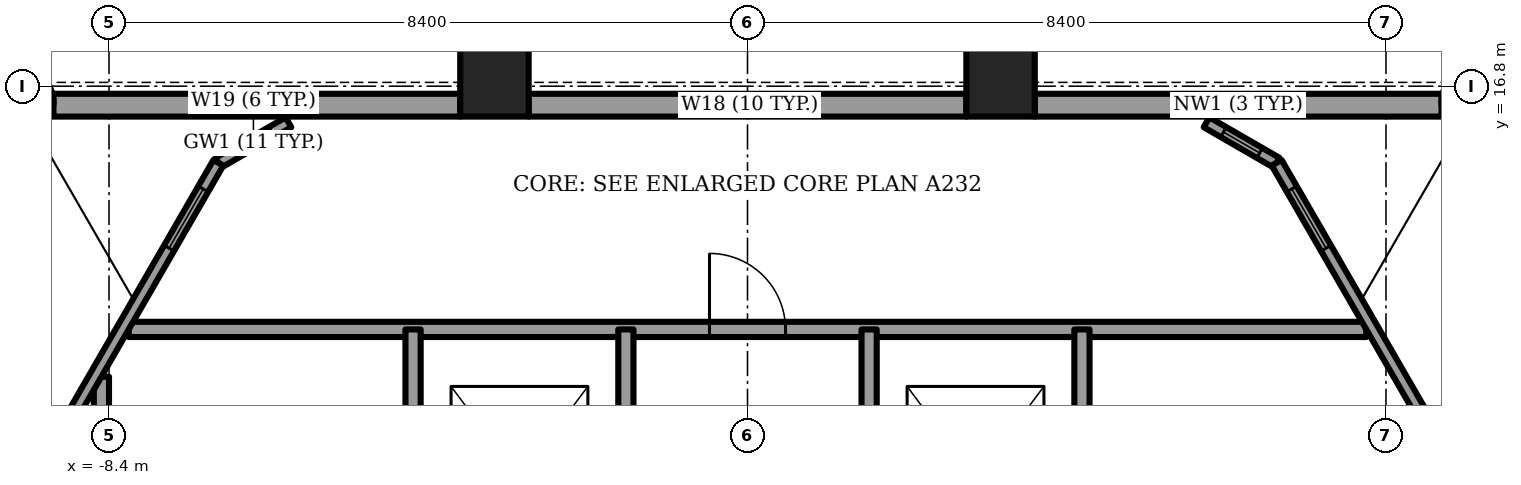
"""IFC4 building model, lengths in metres.
Left out: names, types, materials, properties, quantities, classifications, styles, units other than length and angle.
Written with IfcOpenShell. Run it as: python <this file> out.ifc"""

import sys

from ifc_helpers import new_model, si_unit, direction, frame, frame_2d, origin, origin_2d, place, context, subcontext, project, spatial, rectangle, circle, extrude, element, fill, save


model = new_model("IFC4")
c1 = context("Model", 3, precision=1e-05, world=origin(), true_north=direction((0.0, 1.0)))
c2 = subcontext(c1, "Body", "Model", "MODEL_VIEW")
j1 = project(units=[si_unit("LENGTHUNIT", "METRE"), si_unit("PLANEANGLEUNIT", "RADIAN")], contexts=[c1])
p1 = place(None, origin())
s1 = spatial("IfcSite", under=j1, at=p1, CompositionType="ELEMENT")
p2 = place(p1, origin())
s2 = spatial("IfcBuilding", under=s1, at=p2, CompositionType="ELEMENT")
p3 = place(p2, frame((0.0, 0.0, 214.5)))
s3 = spatial("IfcBuildingStorey", under=s2, at=p3, CompositionType="ELEMENT", Elevation=214.5)
for number, where, z_axis, x_axis in (
    (1, (-9.577, 16.589, -1.2), (0.0, 0.0, 1.0), (1.0, 0.0, 0.0)),
    (2, (9.577, 16.589, -1.2), (0.0, 0.0, 1.0), (1.0, 0.0, 0.0)),
):
    element("IfcColumn", number, at=place(p3, frame(where, z_axis=z_axis, x_axis=x_axis)), inside=s3, PredefinedType="COLUMN", context=c2, shape_type="SweptSolid", body=[
        extrude(circle(Radius=0.45, at=origin_2d()), origin(), (0.0, 0.0, 1.0), 3.75),
    ])
for number, where, z_axis, x_axis in (
    (3, (3.329, 16.85, -1.2), (0.0, 0.0, 1.0), (1.0, 0.0, 0.0)),
    (4, (-3.329, 16.85, -1.2), (0.0, 0.0, 1.0), (1.0, 0.0, 0.0)),
):
    element("IfcColumn", number, at=place(p3, frame(where, z_axis=z_axis, x_axis=x_axis)), inside=s3, PredefinedType="COLUMN", context=c2, shape_type="SweptSolid", body=[
        extrude(rectangle(XDim=0.9, YDim=0.9, at=origin_2d()), origin(), (0.0, 0.0, 1.0), 3.75),
    ])
p4 = place(p3, frame((9.131, 16.55, 0.0), z_axis=(0.0, 0.0, 1.0), x_axis=(-1.0, 0.0, 0.0)))
e5 = element("IfcWall", 5, at=p4, inside=s3, PredefinedType="SOLIDWALL", context=c2, shape_type="SweptSolid", body=[
    extrude(rectangle(XDim=5.352, YDim=0.3, at=frame_2d((2.676, 0.0))), origin(), (0.0, 0.0, 1.0), 2.55),
])
p5 = place(p3, frame((2.879, 16.55, 0.0), z_axis=(0.0, 0.0, 1.0), x_axis=(-1.0, 0.0, 0.0)))
e6 = element("IfcWall", 6, at=p5, inside=s3, PredefinedType="SOLIDWALL", context=c2, shape_type="SweptSolid", body=[
    extrude(rectangle(XDim=5.759, YDim=0.3, at=frame_2d((2.879, 0.0))), origin(), (0.0, 0.0, 1.0), 2.55),
])
p6 = place(p5, frame((2.4, 0.0, 0.15)))
e7 = element("IfcOpeningElement", 7, at=p6, cuts=e6, PredefinedType="OPENING", context=c2, shape_type="SweptSolid", body=[
    extrude(rectangle(XDim=0.9, YDim=2.15, at=frame_2d((0.45, 1.075))), frame((0.0, 0.15, 0.0), z_axis=(0.0, -1.0, 0.0), x_axis=(1.0, 0.0, 0.0)), (0.0, 0.0, 1.0), 0.3),
])
p7 = place(p3, frame((-3.779, 16.55, 0.0), z_axis=(0.0, 0.0, 1.0), x_axis=(-1.0, 0.0, 0.0)))
e8 = element("IfcWall", 8, at=p7, inside=s3, PredefinedType="SOLIDWALL", context=c2, shape_type="SweptSolid", body=[
    extrude(rectangle(XDim=5.352, YDim=0.3, at=frame_2d((2.676, 0.0))), origin(), (0.0, 0.0, 1.0), 2.55),
])
p8 = place(p3, frame((-6.961, 15.792, 0.0), z_axis=(0.0, 0.0, 1.0), x_axis=(-0.49999710518, -0.866027075103, 0.0)))
e9 = element("IfcWall", 9, at=p8, inside=s3, PredefinedType="SOLIDWALL", context=c2, shape_type="SweptSolid", body=[
    extrude(rectangle(XDim=17.621, YDim=0.15, at=frame_2d((8.81, 0.0))), origin(), (0.0, 0.0, 1.0), 3.45),
])
p9 = place(p8, frame((4.296, 0.0, 0.15)))
e10 = element("IfcOpeningElement", 10, at=p9, cuts=e9, PredefinedType="OPENING", context=c2, shape_type="SweptSolid", body=[
    extrude(rectangle(XDim=1.4, YDim=2.85, at=frame_2d((0.7, 1.425))), frame((0.0, 0.075, 0.0), z_axis=(0.0, -1.0, 0.0), x_axis=(1.0, 0.0, 0.0)), (0.0, 0.0, 1.0), 0.15),
])
p10 = place(p8, frame((6.949, 0.0, 0.15)))
e11 = element("IfcOpeningElement", 11, at=p10, cuts=e9, PredefinedType="OPENING", context=c2, shape_type="SweptSolid", body=[
    extrude(rectangle(XDim=0.9, YDim=2.85, at=frame_2d((0.45, 1.425))), frame((0.0, 0.075, 0.0), z_axis=(0.0, -1.0, 0.0), x_axis=(1.0, 0.0, 0.0)), (0.0, 0.0, 1.0), 0.15),
])
p11 = place(p8, frame((8.496, 0.0, 0.15)))
e12 = element("IfcOpeningElement", 12, at=p11, cuts=e9, PredefinedType="OPENING", context=c2, shape_type="SweptSolid", body=[
    extrude(rectangle(XDim=1.4, YDim=2.85, at=frame_2d((0.7, 1.425))), frame((0.0, 0.075, 0.0), z_axis=(0.0, -1.0, 0.0), x_axis=(1.0, 0.0, 0.0)), (0.0, 0.0, 1.0), 0.15),
])
p12 = place(p8, frame((13.185, 0.0, 0.15)))
e13 = element("IfcOpeningElement", 13, at=p12, cuts=e9, PredefinedType="OPENING", context=c2, shape_type="SweptSolid", body=[
    extrude(rectangle(XDim=0.9, YDim=2.85, at=frame_2d((0.45, 1.425))), frame((0.0, 0.075, 0.0), z_axis=(0.0, -1.0, 0.0), x_axis=(1.0, 0.0, 0.0)), (0.0, 0.0, 1.0), 0.15),
])
p13 = place(p8, frame((11.085, 0.0, 0.15)))
e14 = element("IfcOpeningElement", 14, at=p13, cuts=e9, PredefinedType="OPENING", context=c2, shape_type="SweptSolid", body=[
    extrude(rectangle(XDim=1.4, YDim=2.85, at=frame_2d((0.7, 1.425))), frame((0.0, 0.075, 0.0), z_axis=(0.0, -1.0, 0.0), x_axis=(1.0, 0.0, 0.0)), (0.0, 0.0, 1.0), 0.15),
])
p14 = place(p8, frame((0.398, 0.0, 0.15)))
e15 = element("IfcOpeningElement", 15, at=p14, cuts=e9, PredefinedType="OPENING", context=c2, shape_type="SweptSolid", body=[
    extrude(rectangle(XDim=0.9, YDim=2.73, at=frame_2d((0.45, 1.365))), frame((0.0, 0.075, 0.0), z_axis=(0.0, -1.0, 0.0), x_axis=(1.0, 0.0, 0.0)), (0.0, 0.0, 1.0), 0.15),
])
p15 = place(p8, frame((15.308, 0.0, 0.15)))
e16 = element("IfcOpeningElement", 16, at=p15, cuts=e9, PredefinedType="OPENING", context=c2, shape_type="SweptSolid", body=[
    extrude(rectangle(XDim=1.5, YDim=2.73, at=frame_2d((0.75, 1.365))), frame((0.0, 0.075, 0.0), z_axis=(0.0, -1.0, 0.0), x_axis=(1.0, 0.0, 0.0)), (0.0, 0.0, 1.0), 0.15),
])
p16 = place(p3, frame((15.772, 0.532, 0.0), z_axis=(0.0, 0.0, 1.0), x_axis=(-0.49999710518, 0.866027075103, 0.0)))
e17 = element("IfcWall", 17, at=p16, inside=s3, PredefinedType="SOLIDWALL", context=c2, shape_type="SweptSolid", body=[
    extrude(rectangle(XDim=17.621, YDim=0.15, at=frame_2d((8.81, 0.0))), origin(), (0.0, 0.0, 1.0), 3.45),
])
p17 = place(p16, frame((3.525, 0.0, 0.15)))
e18 = element("IfcOpeningElement", 18, at=p17, cuts=e17, PredefinedType="OPENING", context=c2, shape_type="SweptSolid", body=[
    extrude(rectangle(XDim=1.5, YDim=2.85, at=frame_2d((0.75, 1.425))), frame((0.0, 0.075, 0.0), z_axis=(0.0, -1.0, 0.0), x_axis=(1.0, 0.0, 0.0)), (0.0, 0.0, 1.0), 0.15),
])
p18 = place(p16, frame((5.725, 0.0, 0.15)))
e19 = element("IfcOpeningElement", 19, at=p18, cuts=e17, PredefinedType="OPENING", context=c2, shape_type="SweptSolid", body=[
    extrude(rectangle(XDim=1.4, YDim=2.85, at=frame_2d((0.7, 1.425))), frame((0.0, 0.075, 0.0), z_axis=(0.0, -1.0, 0.0), x_axis=(1.0, 0.0, 0.0)), (0.0, 0.0, 1.0), 0.15),
])
p19 = place(p16, frame((7.725, 0.0, 0.15)))
e20 = element("IfcOpeningElement", 20, at=p19, cuts=e17, PredefinedType="OPENING", context=c2, shape_type="SweptSolid", body=[
    extrude(rectangle(XDim=0.9, YDim=2.85, at=frame_2d((0.45, 1.425))), frame((0.0, 0.075, 0.0), z_axis=(0.0, -1.0, 0.0), x_axis=(1.0, 0.0, 0.0)), (0.0, 0.0, 1.0), 0.15),
])
p20 = place(p16, frame((9.271, 0.0, 0.15)))
e21 = element("IfcOpeningElement", 21, at=p20, cuts=e17, PredefinedType="OPENING", context=c2, shape_type="SweptSolid", body=[
    extrude(rectangle(XDim=1.4, YDim=2.85, at=frame_2d((0.7, 1.425))), frame((0.0, 0.075, 0.0), z_axis=(0.0, -1.0, 0.0), x_axis=(1.0, 0.0, 0.0)), (0.0, 0.0, 1.0), 0.15),
])
p21 = place(p16, frame((12.114, 0.0, 0.0)))
e22 = element("IfcOpeningElement", 22, at=p21, cuts=e17, PredefinedType="OPENING", context=c2, shape_type="SweptSolid", body=[
    extrude(rectangle(XDim=1.4, YDim=2.4, at=frame_2d((0.7, 1.2))), frame((0.0, 0.075, 0.0), z_axis=(0.0, -1.0, 0.0), x_axis=(1.0, 0.0, 0.0)), (0.0, 0.0, 1.0), 0.15),
])
p22 = place(p16, frame((0.894, 0.0, 0.15)))
e23 = element("IfcOpeningElement", 23, at=p22, cuts=e17, PredefinedType="OPENING", context=c2, shape_type="SweptSolid", body=[
    extrude(rectangle(XDim=1.5, YDim=2.73, at=frame_2d((0.75, 1.365))), frame((0.0, 0.075, 0.0), z_axis=(0.0, -1.0, 0.0), x_axis=(1.0, 0.0, 0.0)), (0.0, 0.0, 1.0), 0.15),
])
p23 = place(p16, frame((16.323, 0.0, 0.15)))
e24 = element("IfcOpeningElement", 24, at=p23, cuts=e17, PredefinedType="OPENING", context=c2, shape_type="SweptSolid", body=[
    extrude(rectangle(XDim=0.9, YDim=2.73, at=frame_2d((0.45, 1.365))), frame((0.0, 0.075, 0.0), z_axis=(0.0, -1.0, 0.0), x_axis=(1.0, 0.0, 0.0)), (0.0, 0.0, 1.0), 0.15),
])
p24 = place(p3, frame((-6.039, 16.325, 0.0), z_axis=(0.0, 0.0, 1.0), x_axis=(-0.866048165231, -0.499960573946, 0.0)))
e25 = element("IfcWall", 25, at=p24, inside=s3, PredefinedType="SOLIDWALL", context=c2, shape_type="SweptSolid", body=[
    extrude(rectangle(XDim=1.065, YDim=0.15, at=frame_2d((0.532, 0.0))), origin(), (0.0, 0.0, 1.0), 3.45),
])
p25 = place(p24, frame((0.258, 0.0, 0.15)))
e26 = element("IfcOpeningElement", 26, at=p25, cuts=e25, PredefinedType="OPENING", context=c2, shape_type="SweptSolid", body=[
    extrude(rectangle(XDim=0.55, YDim=2.85, at=frame_2d((0.275, 1.425))), frame((0.0, 0.075, 0.0), z_axis=(0.0, -1.0, 0.0), x_axis=(1.0, 0.0, 0.0)), (0.0, 0.0, 1.0), 0.15),
])
p26 = place(p3, frame((6.961, 15.792, 0.0), z_axis=(0.0, 0.0, 1.0), x_axis=(-0.866048165231, 0.499960573946, 0.0)))
e27 = element("IfcWall", 27, at=p26, inside=s3, PredefinedType="SOLIDWALL", context=c2, shape_type="SweptSolid", body=[
    extrude(rectangle(XDim=1.065, YDim=0.15, at=frame_2d((0.532, 0.0))), origin(), (0.0, 0.0, 1.0), 3.45),
])
p27 = place(p26, frame((0.258, 0.0, 0.15)))
e28 = element("IfcOpeningElement", 28, at=p27, cuts=e27, PredefinedType="OPENING", context=c2, shape_type="SweptSolid", body=[
    extrude(rectangle(XDim=0.55, YDim=2.85, at=frame_2d((0.275, 1.425))), frame((0.0, 0.075, 0.0), z_axis=(0.0, -1.0, 0.0), x_axis=(1.0, 0.0, 0.0)), (0.0, 0.0, 1.0), 0.15),
])
p28 = place(p3, frame((-8.141, 13.6, 0.0), z_axis=(0.0, 0.0, 1.0), x_axis=(1.0, 0.0, 0.0)))
e29 = element("IfcWall", 29, at=p28, inside=s3, PredefinedType="PARTITIONING", context=c2, shape_type="SweptSolid", body=[
    extrude(rectangle(XDim=16.281, YDim=0.2, at=frame_2d((8.141, 0.0))), origin(), (0.0, 0.0, 1.0), 3.45),
])
p29 = place(p28, frame((7.641, 0.0, 0.0)))
e30 = element("IfcOpeningElement", 30, at=p29, cuts=e29, PredefinedType="OPENING", context=c2, shape_type="SweptSolid", body=[
    extrude(rectangle(XDim=1.0, YDim=2.1, at=frame_2d((0.5, 1.05))), frame((0.0, 0.1, 0.0), z_axis=(0.0, -1.0, 0.0), x_axis=(1.0, 0.0, 0.0)), (0.0, 0.0, 1.0), 0.2),
])
p30 = place(p3, frame((-8.5, 9.7, 0.0), z_axis=(0.0, 0.0, 1.0), x_axis=(0.0, 1.0, 0.0)))
e31 = element("IfcWall", 31, at=p30, inside=s3, PredefinedType="PARTITIONING", context=c2, shape_type="SweptSolid", body=[
    extrude(rectangle(XDim=3.278, YDim=0.2, at=frame_2d((1.639, 0.0))), origin(), (0.0, 0.0, 1.0), 3.45),
])
p31 = place(p30, frame((1.35, 0.0, 0.0)))
e32 = element("IfcOpeningElement", 32, at=p31, cuts=e31, PredefinedType="OPENING", context=c2, shape_type="SweptSolid", body=[
    extrude(rectangle(XDim=1.2, YDim=2.1, at=frame_2d((0.6, 1.05))), frame((0.0, 0.1, 0.0), z_axis=(0.0, -1.0, 0.0), x_axis=(1.0, 0.0, 0.0)), (0.0, 0.0, 1.0), 0.2),
])
p32 = place(p3, frame((-4.4, 9.7, 0.0), z_axis=(0.0, 0.0, 1.0), x_axis=(0.0, 1.0, 0.0)))
e33 = element("IfcWall", 33, at=p32, inside=s3, PredefinedType="PARTITIONING", context=c2, shape_type="SweptSolid", body=[
    extrude(rectangle(XDim=3.9, YDim=0.2, at=frame_2d((1.95, 0.0))), origin(), (0.0, 0.0, 1.0), 3.45),
])
p33 = place(p32, frame((1.35, 0.0, 0.0)))
e34 = element("IfcOpeningElement", 34, at=p33, cuts=e33, PredefinedType="OPENING", context=c2, shape_type="SweptSolid", body=[
    extrude(rectangle(XDim=1.2, YDim=2.1, at=frame_2d((0.6, 1.05))), frame((0.0, 0.1, 0.0), z_axis=(0.0, -1.0, 0.0), x_axis=(1.0, 0.0, 0.0)), (0.0, 0.0, 1.0), 0.2),
])
p34 = place(p3, frame((4.4, 9.7, 0.0), z_axis=(0.0, 0.0, 1.0), x_axis=(0.0, 1.0, 0.0)))
e35 = element("IfcWall", 35, at=p34, inside=s3, PredefinedType="PARTITIONING", context=c2, shape_type="SweptSolid", body=[
    extrude(rectangle(XDim=3.9, YDim=0.2, at=frame_2d((1.95, 0.0))), origin(), (0.0, 0.0, 1.0), 3.45),
])
p35 = place(p34, frame((1.35, 0.0, 0.0)))
e36 = element("IfcOpeningElement", 36, at=p35, cuts=e35, PredefinedType="OPENING", context=c2, shape_type="SweptSolid", body=[
    extrude(rectangle(XDim=1.2, YDim=2.1, at=frame_2d((0.6, 1.05))), frame((0.0, 0.1, 0.0), z_axis=(0.0, -1.0, 0.0), x_axis=(1.0, 0.0, 0.0)), (0.0, 0.0, 1.0), 0.2),
])
for number, where, z_axis, x_axis in (
    (37, (-1.6, 9.7, 0.0), (0.0, 0.0, 1.0), (0.0, 1.0, 0.0)),
    (38, (1.6, 9.7, 0.0), (0.0, 0.0, 1.0), (0.0, 1.0, 0.0)),
):
    element("IfcWall", number, at=place(p3, frame(where, z_axis=z_axis, x_axis=x_axis)), inside=s3, PredefinedType="PARTITIONING", context=c2, shape_type="SweptSolid", body=[
        extrude(rectangle(XDim=3.9, YDim=0.2, at=frame_2d((1.95, 0.0))), origin(), (0.0, 0.0, 1.0), 3.45),
    ])
p36 = place(p6, origin())
e39 = element("IfcWindow", 39, at=p36, inside=s3, PartitioningType="SINGLE_PANEL", PredefinedType="WINDOW", context=c2, shape_type="SweptSolid", body=[
    extrude(rectangle(XDim=0.9, YDim=2.15, at=frame_2d((0.45, 1.075))), frame((0.0, 0.03, 0.0), z_axis=(0.0, -1.0, 0.0), x_axis=(1.0, 0.0, 0.0)), (0.0, 0.0, 1.0), 0.06),
])
fill(e7, e39)
p37 = place(p14, origin())
e40 = element("IfcWindow", 40, at=p37, inside=s3, PartitioningType="SINGLE_PANEL", PredefinedType="WINDOW", context=c2, shape_type="SweptSolid", body=[
    extrude(rectangle(XDim=0.9, YDim=2.73, at=frame_2d((0.45, 1.365))), frame((0.0, 0.03, 0.0), z_axis=(0.0, -1.0, 0.0), x_axis=(1.0, 0.0, 0.0)), (0.0, 0.0, 1.0), 0.06),
])
fill(e15, e40)
p38 = place(p23, origin())
e41 = element("IfcWindow", 41, at=p38, inside=s3, PartitioningType="SINGLE_PANEL", PredefinedType="WINDOW", context=c2, shape_type="SweptSolid", body=[
    extrude(rectangle(XDim=0.9, YDim=2.73, at=frame_2d((0.45, 1.365))), frame((0.0, 0.03, 0.0), z_axis=(0.0, -1.0, 0.0), x_axis=(1.0, 0.0, 0.0)), (0.0, 0.0, 1.0), 0.06),
])
fill(e24, e41)
p39 = place(p25, origin())
e42 = element("IfcWindow", 42, at=p39, inside=s3, PartitioningType="SINGLE_PANEL", PredefinedType="WINDOW", context=c2, shape_type="SweptSolid", body=[
    extrude(rectangle(XDim=0.55, YDim=2.85, at=frame_2d((0.275, 1.425))), frame((0.0, 0.03, 0.0), z_axis=(0.0, -1.0, 0.0), x_axis=(1.0, 0.0, 0.0)), (0.0, 0.0, 1.0), 0.06),
])
fill(e26, e42)
p40 = place(p27, origin())
e43 = element("IfcWindow", 43, at=p40, inside=s3, PartitioningType="SINGLE_PANEL", PredefinedType="WINDOW", context=c2, shape_type="SweptSolid", body=[
    extrude(rectangle(XDim=0.55, YDim=2.85, at=frame_2d((0.275, 1.425))), frame((0.0, 0.03, 0.0), z_axis=(0.0, -1.0, 0.0), x_axis=(1.0, 0.0, 0.0)), (0.0, 0.0, 1.0), 0.06),
])
fill(e28, e43)
p41 = place(p29, origin())
e44 = element("IfcDoor", 44, at=p41, inside=s3, OperationType="SINGLE_SWING_LEFT", PredefinedType="DOOR", context=c2, shape_type="SweptSolid", body=[
    extrude(rectangle(XDim=1.0, YDim=2.1, at=frame_2d((0.5, 1.05))), frame((0.0, 0.025, 0.0), z_axis=(0.0, -1.0, 0.0), x_axis=(1.0, 0.0, 0.0)), (0.0, 0.0, 1.0), 0.05),
])
fill(e30, e44)
save(model, sys.argv[1])
